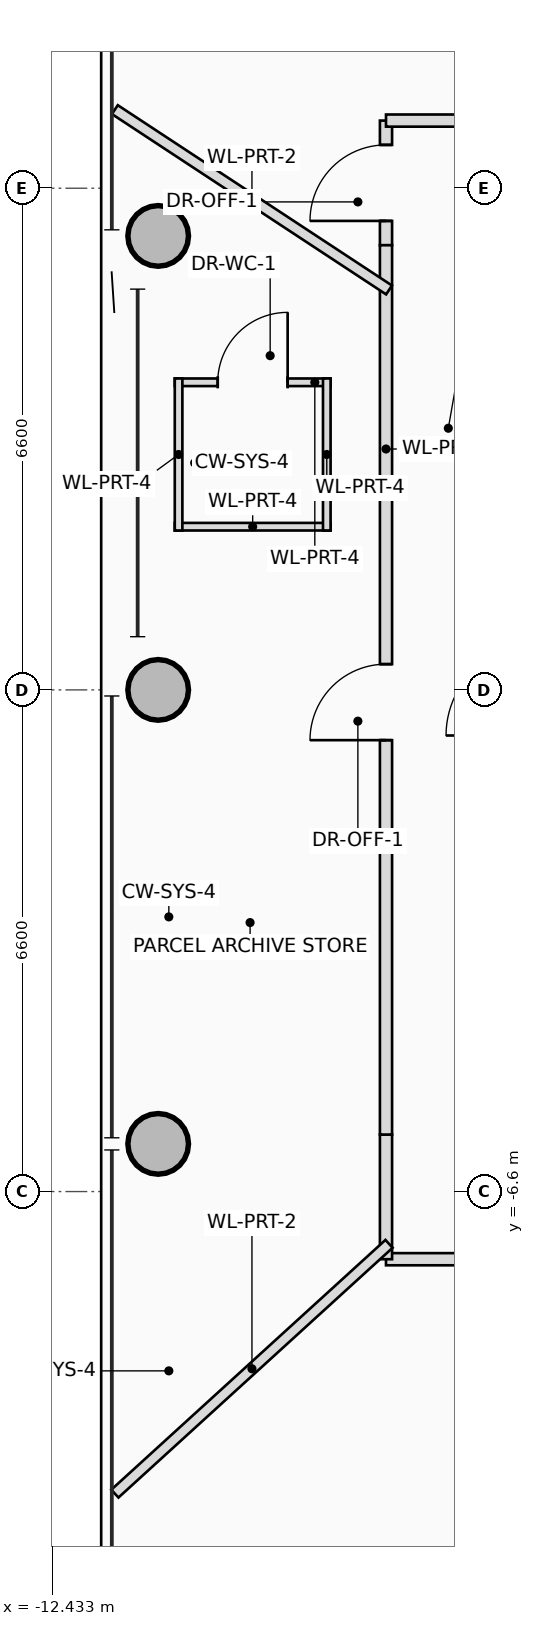
"""IFC4 building model, lengths in metres.
Left out: names, types, materials, properties, quantities, classifications, styles, units other than length and angle.
Written with IfcOpenShell. Run it as: python <this file> out.ifc"""

import sys

from ifc_helpers import new_model, si_unit, direction, frame, frame_2d, origin, origin_2d, place, context, subcontext, project, spatial, rectangle, hollow_circle, extrude, source, transform, mapped, element, fill, save


model = new_model("IFC4")
c1 = context("Model", 3, precision=1e-05, world=origin(), true_north=direction((0.0, 1.0)))
c2 = subcontext(c1, "Body", "Model", "MODEL_VIEW")
j1 = project(units=[si_unit("LENGTHUNIT", "METRE"), si_unit("PLANEANGLEUNIT", "RADIAN")], contexts=[c1])
p1 = place(None, origin())
s1 = spatial("IfcSite", under=j1, at=p1, CompositionType="ELEMENT")
p2 = place(p1, origin())
s2 = spatial("IfcBuilding", under=s1, at=p2, CompositionType="ELEMENT")
p3 = place(p2, frame((0.0, 0.0, 293.3)))
s3 = spatial("IfcBuildingStorey", under=s2, at=p3, CompositionType="ELEMENT", Elevation=293.3)
m1 = source(origin(), c2, "Body", "SweptSolid", [
    extrude(hollow_circle(Radius=0.4, WallThickness=0.028, at=origin_2d()), origin(), (0.0, 0.0, 1.0), 3.45),
])
for number, where, z_axis, x_axis in (
    (1, (-11.037, 5.973, 0.0), (0.0, 0.0, 1.0), (1.0, 0.0, 0.0)),
    (2, (-11.037, 0.0, 0.0), (0.0, 0.0, 1.0), (1.0, 0.0, 0.0)),
    (3, (-11.037, -5.973, 0.0), (0.0, 0.0, 1.0), (1.0, 0.0, 0.0)),
):
    element("IfcColumn", number, at=place(p3, frame(where, z_axis=z_axis, x_axis=x_axis)), inside=s3, PredefinedType="COLUMN", context=c2, shape_type="MappedRepresentation", body=[
        mapped(m1, transform((0.0, 0.0, 0.0), scale=1.0)),
    ])
p4 = place(p3, frame((-10.819, 4.047, 0.0), z_axis=(0.0, 0.0, 1.0), x_axis=(1.0, 0.0, 0.0)))
e4 = element("IfcWall", 4, at=p4, inside=s3, PredefinedType="PARTITIONING", context=c2, shape_type="SweptSolid", body=[
    extrude(rectangle(XDim=2.05, YDim=0.1, at=frame_2d((1.025, 0.0))), origin(), (0.0, 0.0, 1.0), 2.905),
])
p5 = place(p4, frame((0.565, 0.0, 0.0)))
e5 = element("IfcOpeningElement", 5, at=p5, cuts=e4, PredefinedType="OPENING", context=c2, shape_type="SweptSolid", body=[
    extrude(rectangle(XDim=0.92, YDim=2.1, at=frame_2d((0.46, 1.05))), frame((0.0, 0.06, 0.0), z_axis=(0.0, -1.0, 0.0), x_axis=(1.0, 0.0, 0.0)), (0.0, 0.0, 1.0), 0.12),
])
p6 = place(p3, frame((-8.769, 2.147, 0.0), z_axis=(0.0, 0.0, 1.0), x_axis=(-1.0, 0.0, 0.0)))
e6 = element("IfcWall", 6, at=p6, inside=s3, PredefinedType="PARTITIONING", context=c2, shape_type="SweptSolid", body=[
    extrude(rectangle(XDim=2.05, YDim=0.1, at=frame_2d((1.025, 0.0))), origin(), (0.0, 0.0, 1.0), 2.905),
])
for number, where, z_axis, x_axis in (
    (7, (-8.819, 4.097, 0.0), (0.0, 0.0, 1.0), (0.0, -1.0, 0.0)),
    (8, (-10.769, 2.097, 0.0), (0.0, 0.0, 1.0), (0.0, 1.0, 0.0)),
):
    element("IfcWall", number, at=place(p3, frame(where, z_axis=z_axis, x_axis=x_axis)), inside=s3, PredefinedType="PARTITIONING", context=c2, shape_type="SweptSolid", body=[
        extrude(rectangle(XDim=2.0, YDim=0.1, at=frame_2d((1.0, 0.0))), origin(), (0.0, 0.0, 1.0), 3.25),
    ])
p7 = place(p3, frame((-8.04, 5.85, 0.0), z_axis=(0.0, 0.0, 1.0), x_axis=(0.0, 1.0, 0.0)))
e9 = element("IfcWall", 9, at=p7, inside=s3, PredefinedType="PARTITIONING", context=c2, shape_type="SweptSolid", body=[
    extrude(rectangle(XDim=1.64, YDim=0.16, at=frame_2d((0.82, 0.0))), origin(), (0.0, 0.0, 1.0), 2.905),
])
p8 = place(p7, frame((0.32, 0.0, 0.0)))
e10 = element("IfcOpeningElement", 10, at=p8, cuts=e9, PredefinedType="OPENING", context=c2, shape_type="SweptSolid", body=[
    extrude(rectangle(XDim=1.0, YDim=2.25, at=frame_2d((0.5, 1.125))), frame((0.0, 0.09, 0.0), z_axis=(0.0, -1.0, 0.0), x_axis=(1.0, 0.0, 0.0)), (0.0, 0.0, 1.0), 0.18),
])
for number, where, z_axis, x_axis in (
    (11, (-8.04, 7.49, 0.0), (0.0, 0.0, 1.0), (1.0, 0.0, 0.0)),
    (12, (-6.36, -7.49, 0.0), (0.0, 0.0, 1.0), (-1.0, 0.0, 0.0)),
):
    element("IfcWall", number, at=place(p3, frame(where, z_axis=z_axis, x_axis=x_axis)), inside=s3, PredefinedType="PARTITIONING", context=c2, shape_type="SweptSolid", body=[
        extrude(rectangle(XDim=1.68, YDim=0.16, at=frame_2d((0.84, 0.0))), origin(), (0.0, 0.0, 1.0), 2.655),
    ])
p9 = place(p3, frame((-8.04, -7.49, 0.0), z_axis=(0.0, 0.0, 1.0), x_axis=(0.0, 1.0, 0.0)))
e13 = element("IfcWall", 13, at=p9, inside=s3, PredefinedType="PARTITIONING", context=c2, shape_type="SweptSolid", body=[
    extrude(rectangle(XDim=1.64, YDim=0.16, at=frame_2d((0.82, 0.0))), origin(), (0.0, 0.0, 1.0), 3.25),
])
p10 = place(p3, frame((-8.04, -5.85, 0.0), z_axis=(0.0, 0.0, 1.0), x_axis=(0.0, 1.0, 0.0)))
e14 = element("IfcWall", 14, at=p10, inside=s3, PredefinedType="PARTITIONING", context=c2, shape_type="SweptSolid", body=[
    extrude(rectangle(XDim=11.7, YDim=0.16, at=frame_2d((5.85, 0.0))), origin(), (0.0, 0.0, 1.0), 2.655),
])
p11 = place(p10, frame((5.189, 0.0, 0.0)))
e15 = element("IfcOpeningElement", 15, at=p11, cuts=e14, PredefinedType="OPENING", context=c2, shape_type="SweptSolid", body=[
    extrude(rectangle(XDim=1.0, YDim=2.25, at=frame_2d((0.5, 1.125))), frame((0.0, 0.09, 0.0), z_axis=(0.0, -1.0, 0.0), x_axis=(1.0, 0.0, 0.0)), (0.0, 0.0, 1.0), 0.18),
])
p12 = place(p3, frame((-8.0, 5.262, 0.0), z_axis=(0.0, 0.0, 1.0), x_axis=(-0.835496328285, 0.549496028578, 0.0)))
e16 = element("IfcWall", 16, at=p12, inside=s3, PredefinedType="PARTITIONING", context=c2, shape_type="SweptSolid", body=[
    extrude(rectangle(XDim=4.318, YDim=0.14, at=frame_2d((2.159, 0.0))), origin(), (0.0, 0.0, 1.0), 2.655),
])
p13 = place(p3, frame((-8.0, -7.288, 0.0), z_axis=(0.0, 0.0, 1.0), x_axis=(-0.739260540131, -0.673419522886, 0.0)))
e17 = element("IfcWall", 17, at=p13, inside=s3, PredefinedType="PARTITIONING", context=c2, shape_type="SweptSolid", body=[
    extrude(rectangle(XDim=4.88, YDim=0.14, at=frame_2d((2.44, 0.0))), origin(), (0.0, 0.0, 1.0), 2.815),
])
p14 = place(p5, origin())
e18 = element("IfcDoor", 18, at=p14, inside=s3, OperationType="SINGLE_SWING_RIGHT", PredefinedType="DOOR", context=c2, shape_type="SweptSolid", body=[
    extrude(rectangle(XDim=0.92, YDim=2.1, at=frame_2d((0.46, 1.05))), frame((0.0, 0.025, 0.0), z_axis=(0.0, -1.0, 0.0), x_axis=(1.0, 0.0, 0.0)), (0.0, 0.0, 1.0), 0.05),
])
fill(e5, e18)
p15 = place(p8, origin())
e19 = element("IfcDoor", 19, at=p15, inside=s3, OperationType="SINGLE_SWING_LEFT", PredefinedType="DOOR", context=c2, shape_type="SweptSolid", body=[
    extrude(rectangle(XDim=1.0, YDim=2.25, at=frame_2d((0.5, 1.125))), frame((0.0, 0.025, 0.0), z_axis=(0.0, -1.0, 0.0), x_axis=(1.0, 0.0, 0.0)), (0.0, 0.0, 1.0), 0.05),
])
fill(e10, e19)
p16 = place(p11, origin())
e20 = element("IfcDoor", 20, at=p16, inside=s3, OperationType="SINGLE_SWING_LEFT", PredefinedType="DOOR", context=c2, shape_type="SweptSolid", body=[
    extrude(rectangle(XDim=1.0, YDim=2.25, at=frame_2d((0.5, 1.125))), frame((0.0, 0.025, 0.0), z_axis=(0.0, -1.0, 0.0), x_axis=(1.0, 0.0, 0.0)), (0.0, 0.0, 1.0), 0.05),
])
fill(e15, e20)
save(model, sys.argv[1])
